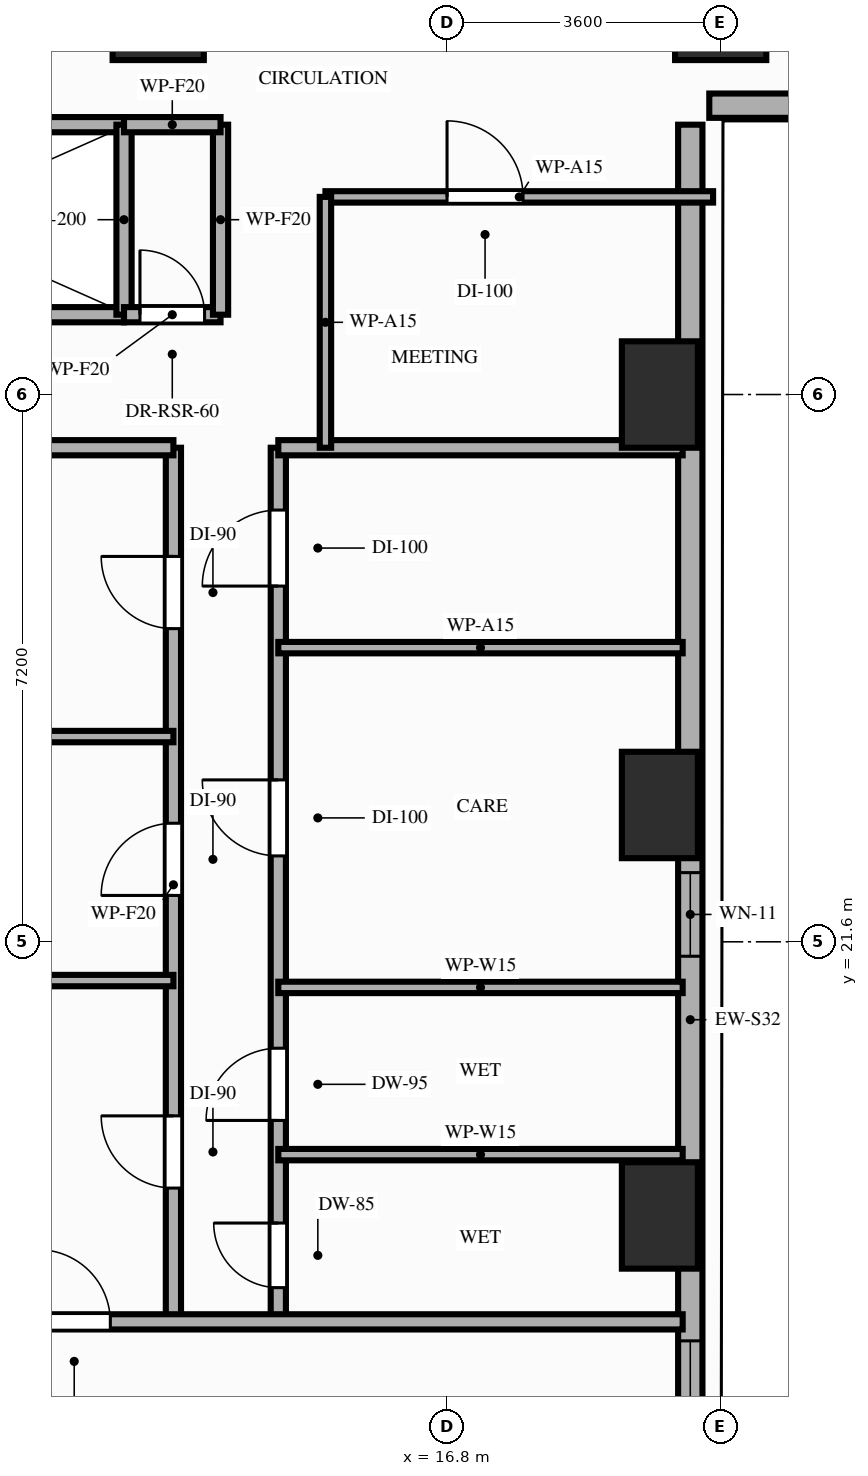
"""IFC4 building model, lengths in metres.
Left out: names, types, materials, properties, quantities, classifications, styles, units other than length and angle.
Written with IfcOpenShell. Run it as: python <this file> out.ifc"""

import sys

from ifc_helpers import new_model, si_unit, direction, frame, frame_2d, origin, origin_2d, place, context, subcontext, project, spatial, rectangle, extrude, element, fill, save


model = new_model("IFC4")
c1 = context("Model", 3, precision=1e-05, world=origin(), true_north=direction((0.0, 1.0)))
c2 = subcontext(c1, "Body", "Model", "MODEL_VIEW")
j1 = project(units=[si_unit("LENGTHUNIT", "METRE"), si_unit("PLANEANGLEUNIT", "RADIAN")], contexts=[c1])
p1 = place(None, origin())
s1 = spatial("IfcSite", under=j1, at=p1, CompositionType="ELEMENT")
p2 = place(p1, origin())
s2 = spatial("IfcBuilding", under=s1, at=p2, CompositionType="ELEMENT")
p3 = place(p2, frame((0.0, 0.0, 30.2)))
s3 = spatial("IfcBuildingStorey", under=s2, at=p3, CompositionType="ELEMENT", Elevation=30.2)
for number, where, z_axis, x_axis in (
    (1, (13.0, 33.8, 0.0), (0.0, 0.0, 1.0), (1.0, 0.0, 0.0)),
    (2, (20.4, 33.8, 0.0), (0.0, 0.0, 1.0), (1.0, 0.0, 0.0)),
):
    element("IfcColumn", number, at=place(p3, frame(where, z_axis=z_axis, x_axis=x_axis)), inside=s3, PredefinedType="COLUMN", context=c2, shape_type="SweptSolid", body=[
        extrude(rectangle(XDim=1.2, YDim=1.2, at=origin_2d()), origin(), (0.0, 0.0, 1.0), 3.2),
    ])
for number, where, z_axis, x_axis in (
    (3, (19.6, 18.0, 0.0), (0.0, 0.0, 1.0), (1.0, 0.0, 0.0)),
    (4, (19.6, 23.4, 0.0), (0.0, 0.0, 1.0), (1.0, 0.0, 0.0)),
    (5, (19.6, 28.8, 0.0), (0.0, 0.0, 1.0), (1.0, 0.0, 0.0)),
):
    element("IfcColumn", number, at=place(p3, frame(where, z_axis=z_axis, x_axis=x_axis)), inside=s3, PredefinedType="COLUMN", context=c2, shape_type="SweptSolid", body=[
        extrude(rectangle(XDim=1.0, YDim=1.4, at=origin_2d()), origin(), (0.0, 0.0, 1.0), 3.2),
    ])
p4 = place(p3, frame((20.0, 8.8, 0.0), z_axis=(0.0, 0.0, 1.0), x_axis=(0.0, 1.0, 0.0)))
e6 = element("IfcWall", 6, at=p4, inside=s3, PredefinedType="STANDARD", context=c2, shape_type="SweptSolid", body=[
    extrude(rectangle(XDim=23.55, YDim=0.32, at=frame_2d((11.775, 0.0))), origin(), (0.0, 0.0, 1.0), 2.41),
])
p5 = place(p4, frame((12.61, 0.0, 0.85)))
e7 = element("IfcOpeningElement", 7, at=p5, cuts=e6, PredefinedType="OPENING", context=c2, shape_type="SweptSolid", body=[
    extrude(rectangle(XDim=1.1, YDim=1.31, at=frame_2d((0.55, 0.655))), frame((0.0, 0.17, 0.0), z_axis=(0.0, -1.0, 0.0), x_axis=(1.0, 0.0, 0.0)), (0.0, 0.0, 1.0), 0.34),
])
p6 = place(p4, frame((5.15, 0.0, 0.85)))
e8 = element("IfcOpeningElement", 8, at=p6, cuts=e6, PredefinedType="OPENING", context=c2, shape_type="SweptSolid", body=[
    extrude(rectangle(XDim=2.4, YDim=1.31, at=frame_2d((1.2, 0.655))), frame((0.0, 0.17, 0.0), z_axis=(0.0, -1.0, 0.0), x_axis=(1.0, 0.0, 0.0)), (0.0, 0.0, 1.0), 0.34),
])
p7 = place(p3, frame((20.25, 32.6, 0.0), z_axis=(0.0, 0.0, 1.0), x_axis=(1.0, 0.0, 0.0)))
e9 = element("IfcWall", 9, at=p7, inside=s3, PredefinedType="STANDARD", context=c2, shape_type="SweptSolid", body=[
    extrude(rectangle(XDim=7.35, YDim=0.32, at=frame_2d((3.675, 0.0))), origin(), (0.0, 0.0, 1.0), 2.41),
])
for number, where, z_axis, x_axis in (
    (10, (7.0, 29.85, 0.0), (0.0, 0.0, 1.0), (1.0, 0.0, 0.0)),
    (11, (7.0, 32.35, 0.0), (0.0, 0.0, 1.0), (1.0, 0.0, 0.0)),
):
    element("IfcWall", number, at=place(p3, frame(where, z_axis=z_axis, x_axis=x_axis)), inside=s3, PredefinedType="MOVABLE", context=c2, shape_type="SweptSolid", body=[
        extrude(rectangle(XDim=5.55, YDim=0.2, at=frame_2d((2.775, 0.0))), origin(), (0.0, 0.0, 1.0), 3.02),
    ])
p8 = place(p3, frame((12.55, 29.85, 0.0), z_axis=(0.0, 0.0, 1.0), x_axis=(0.0, 1.0, 0.0)))
e12 = element("IfcWall", 12, at=p8, inside=s3, PredefinedType="MOVABLE", context=c2, shape_type="SweptSolid", body=[
    extrude(rectangle(XDim=2.5, YDim=0.2, at=frame_2d((1.25, 0.0))), origin(), (0.0, 0.0, 1.0), 3.02),
])
p9 = place(p3, frame((12.55, 29.85, 0.0), z_axis=(0.0, 0.0, 1.0), x_axis=(1.0, 0.0, 0.0)))
e13 = element("IfcWall", 13, at=p9, inside=s3, PredefinedType="PARTITIONING", context=c2, shape_type="SweptSolid", body=[
    extrude(rectangle(XDim=1.27, YDim=0.2, at=frame_2d((0.635, 0.0))), origin(), (0.0, 0.0, 1.0), 3.02),
])
p10 = place(p9, frame((0.21, 0.0, 0.0)))
e14 = element("IfcOpeningElement", 14, at=p10, cuts=e13, PredefinedType="OPENING", context=c2, shape_type="SweptSolid", body=[
    extrude(rectangle(XDim=0.85, YDim=2.05, at=frame_2d((0.425, 1.025))), frame((0.0, 0.11, 0.0), z_axis=(0.0, -1.0, 0.0), x_axis=(1.0, 0.0, 0.0)), (0.0, 0.0, 1.0), 0.22),
])
p11 = place(p3, frame((13.82, 29.85, 0.0), z_axis=(0.0, 0.0, 1.0), x_axis=(0.0, 1.0, 0.0)))
e15 = element("IfcWall", 15, at=p11, inside=s3, PredefinedType="PARTITIONING", context=c2, shape_type="SweptSolid", body=[
    extrude(rectangle(XDim=2.5, YDim=0.2, at=frame_2d((1.25, 0.0))), origin(), (0.0, 0.0, 1.0), 3.02),
])
p12 = place(p3, frame((12.55, 32.35, 0.0), z_axis=(0.0, 0.0, 1.0), x_axis=(1.0, 0.0, 0.0)))
e16 = element("IfcWall", 16, at=p12, inside=s3, PredefinedType="PARTITIONING", context=c2, shape_type="SweptSolid", body=[
    extrude(rectangle(XDim=1.27, YDim=0.2, at=frame_2d((0.635, 0.0))), origin(), (0.0, 0.0, 1.0), 3.02),
])
p13 = place(p3, frame((13.2, 16.6, 0.0), z_axis=(0.0, 0.0, 1.0), x_axis=(0.0, 1.0, 0.0)))
e17 = element("IfcWall", 17, at=p13, inside=s3, PredefinedType="PARTITIONING", context=c2, shape_type="SweptSolid", body=[
    extrude(rectangle(XDim=11.5, YDim=0.2, at=frame_2d((5.75, 0.0))), origin(), (0.0, 0.0, 1.0), 2.41),
])
p14 = place(p13, frame((1.76, 0.0, 0.0)))
e18 = element("IfcOpeningElement", 18, at=p14, cuts=e17, PredefinedType="OPENING", context=c2, shape_type="SweptSolid", body=[
    extrude(rectangle(XDim=0.95, YDim=2.15, at=frame_2d((0.475, 1.075))), frame((0.0, 0.11, 0.0), z_axis=(0.0, -1.0, 0.0), x_axis=(1.0, 0.0, 0.0)), (0.0, 0.0, 1.0), 0.22),
])
p15 = place(p13, frame((5.61, 0.0, 0.0)))
e19 = element("IfcOpeningElement", 19, at=p15, cuts=e17, PredefinedType="OPENING", context=c2, shape_type="SweptSolid", body=[
    extrude(rectangle(XDim=0.95, YDim=2.15, at=frame_2d((0.475, 1.075))), frame((0.0, 0.11, 0.0), z_axis=(0.0, -1.0, 0.0), x_axis=(1.0, 0.0, 0.0)), (0.0, 0.0, 1.0), 0.22),
])
p16 = place(p13, frame((9.12, 0.0, 0.0)))
e20 = element("IfcOpeningElement", 20, at=p16, cuts=e17, PredefinedType="OPENING", context=c2, shape_type="SweptSolid", body=[
    extrude(rectangle(XDim=0.95, YDim=2.15, at=frame_2d((0.475, 1.075))), frame((0.0, 0.11, 0.0), z_axis=(0.0, -1.0, 0.0), x_axis=(1.0, 0.0, 0.0)), (0.0, 0.0, 1.0), 0.22),
])
p17 = place(p3, frame((14.58, 16.6, 0.0), z_axis=(0.0, 0.0, 1.0), x_axis=(0.0, 1.0, 0.0)))
e21 = element("IfcWall", 21, at=p17, inside=s3, PredefinedType="PARTITIONING", context=c2, shape_type="SweptSolid", body=[
    extrude(rectangle(XDim=11.5, YDim=0.2, at=frame_2d((5.75, 0.0))), origin(), (0.0, 0.0, 1.0), 2.41),
])
p18 = place(p17, frame((0.45, 0.0, 0.0)))
e22 = element("IfcOpeningElement", 22, at=p18, cuts=e21, PredefinedType="OPENING", context=c2, shape_type="SweptSolid", body=[
    extrude(rectangle(XDim=0.85, YDim=2.1, at=frame_2d((0.425, 1.05))), frame((0.0, 0.11, 0.0), z_axis=(0.0, -1.0, 0.0), x_axis=(1.0, 0.0, 0.0)), (0.0, 0.0, 1.0), 0.22),
])
p19 = place(p17, frame((2.65, 0.0, 0.0)))
e23 = element("IfcOpeningElement", 23, at=p19, cuts=e21, PredefinedType="OPENING", context=c2, shape_type="SweptSolid", body=[
    extrude(rectangle(XDim=0.95, YDim=2.1, at=frame_2d((0.475, 1.05))), frame((0.0, 0.11, 0.0), z_axis=(0.0, -1.0, 0.0), x_axis=(1.0, 0.0, 0.0)), (0.0, 0.0, 1.0), 0.22),
])
p20 = place(p17, frame((6.13, 0.0, 0.0)))
e24 = element("IfcOpeningElement", 24, at=p20, cuts=e21, PredefinedType="OPENING", context=c2, shape_type="SweptSolid", body=[
    extrude(rectangle(XDim=1.0, YDim=2.15, at=frame_2d((0.5, 1.075))), frame((0.0, 0.11, 0.0), z_axis=(0.0, -1.0, 0.0), x_axis=(1.0, 0.0, 0.0)), (0.0, 0.0, 1.0), 0.22),
])
p21 = place(p17, frame((9.68, 0.0, 0.0)))
e25 = element("IfcOpeningElement", 25, at=p21, cuts=e21, PredefinedType="OPENING", context=c2, shape_type="SweptSolid", body=[
    extrude(rectangle(XDim=1.0, YDim=2.15, at=frame_2d((0.5, 1.075))), frame((0.0, 0.11, 0.0), z_axis=(0.0, -1.0, 0.0), x_axis=(1.0, 0.0, 0.0)), (0.0, 0.0, 1.0), 0.22),
])
p22 = place(p3, frame((3.9, 16.6, 0.0), z_axis=(0.0, 0.0, 1.0), x_axis=(1.0, 0.0, 0.0)))
e26 = element("IfcWall", 26, at=p22, inside=s3, PredefinedType="PARTITIONING", context=c2, shape_type="SweptSolid", body=[
    extrude(rectangle(XDim=16.0, YDim=0.2, at=frame_2d((8.0, 0.0))), origin(), (0.0, 0.0, 1.0), 2.41),
])
p23 = place(p22, frame((7.52, 0.0, 0.0)))
e27 = element("IfcOpeningElement", 27, at=p23, cuts=e26, PredefinedType="OPENING", context=c2, shape_type="SweptSolid", body=[
    extrude(rectangle(XDim=0.95, YDim=2.15, at=frame_2d((0.475, 1.075))), frame((0.0, 0.11, 0.0), z_axis=(0.0, -1.0, 0.0), x_axis=(1.0, 0.0, 0.0)), (0.0, 0.0, 1.0), 0.22),
])
p24 = place(p3, frame((6.0, 28.1, 0.0), z_axis=(0.0, 0.0, 1.0), x_axis=(1.0, 0.0, 0.0)))
e28 = element("IfcWall", 28, at=p24, inside=s3, PredefinedType="PARTITIONING", context=c2, shape_type="SweptSolid", body=[
    extrude(rectangle(XDim=7.2, YDim=0.2, at=frame_2d((3.6, 0.0))), origin(), (0.0, 0.0, 1.0), 3.02),
])
p25 = place(p3, frame((14.58, 28.1, 0.0), z_axis=(0.0, 0.0, 1.0), x_axis=(1.0, 0.0, 0.0)))
e29 = element("IfcWall", 29, at=p25, inside=s3, PredefinedType="PARTITIONING", context=c2, shape_type="SweptSolid", body=[
    extrude(rectangle(XDim=5.32, YDim=0.2, at=frame_2d((2.66, 0.0))), origin(), (0.0, 0.0, 1.0), 2.41),
])
p26 = place(p3, frame((15.2, 31.4, 0.0), z_axis=(0.0, 0.0, 1.0), x_axis=(1.0, 0.0, 0.0)))
e30 = element("IfcWall", 30, at=p26, inside=s3, PredefinedType="PARTITIONING", context=c2, shape_type="SweptSolid", body=[
    extrude(rectangle(XDim=5.1, YDim=0.15, at=frame_2d((2.55, 0.0))), origin(), (0.0, 0.0, 1.0), 2.41),
])
p27 = place(p26, frame((1.6, 0.0, 0.0)))
e31 = element("IfcOpeningElement", 31, at=p27, cuts=e30, PredefinedType="OPENING", context=c2, shape_type="SweptSolid", body=[
    extrude(rectangle(XDim=1.0, YDim=2.15, at=frame_2d((0.5, 1.075))), frame((0.0, 0.085, 0.0), z_axis=(0.0, -1.0, 0.0), x_axis=(1.0, 0.0, 0.0)), (0.0, 0.0, 1.0), 0.17),
])
p28 = place(p3, frame((15.2, 28.1, 0.0), z_axis=(0.0, 0.0, 1.0), x_axis=(0.0, 1.0, 0.0)))
e32 = element("IfcWall", 32, at=p28, inside=s3, PredefinedType="PARTITIONING", context=c2, shape_type="SweptSolid", body=[
    extrude(rectangle(XDim=3.3, YDim=0.15, at=frame_2d((1.65, 0.0))), origin(), (0.0, 0.0, 1.0), 2.41),
])
for number, where, z_axis, x_axis in (
    (33, (3.9, 21.09, 0.0), (0.0, 0.0, 1.0), (1.0, 0.0, 0.0)),
    (34, (3.9, 24.3, 0.0), (0.0, 0.0, 1.0), (1.0, 0.0, 0.0)),
):
    element("IfcWall", number, at=place(p3, frame(where, z_axis=z_axis, x_axis=x_axis)), inside=s3, PredefinedType="PARTITIONING", context=c2, shape_type="SweptSolid", body=[
        extrude(rectangle(XDim=9.3, YDim=0.15, at=frame_2d((4.65, 0.0))), origin(), (0.0, 0.0, 1.0), 2.41),
    ])
for number, where, z_axis, x_axis in (
    (35, (14.58, 18.8, 0.0), (0.0, 0.0, 1.0), (1.0, 0.0, 0.0)),
    (36, (14.58, 21.0, 0.0), (0.0, 0.0, 1.0), (1.0, 0.0, 0.0)),
    (37, (14.58, 25.47, 0.0), (0.0, 0.0, 1.0), (1.0, 0.0, 0.0)),
):
    element("IfcWall", number, at=place(p3, frame(where, z_axis=z_axis, x_axis=x_axis)), inside=s3, PredefinedType="PARTITIONING", context=c2, shape_type="SweptSolid", body=[
        extrude(rectangle(XDim=5.32, YDim=0.15, at=frame_2d((2.66, 0.0))), origin(), (0.0, 0.0, 1.0), 2.41),
    ])
p29 = place(p5, origin())
e38 = element("IfcWindow", 38, at=p29, inside=s3, PartitioningType="SINGLE_PANEL", PredefinedType="WINDOW", context=c2, shape_type="SweptSolid", body=[
    extrude(rectangle(XDim=1.1, YDim=1.31, at=frame_2d((0.55, 0.655))), frame((0.0, 0.03, 0.0), z_axis=(0.0, -1.0, 0.0), x_axis=(1.0, 0.0, 0.0)), (0.0, 0.0, 1.0), 0.06),
])
fill(e7, e38)
p30 = place(p6, origin())
e39 = element("IfcWindow", 39, at=p30, inside=s3, PartitioningType="SINGLE_PANEL", PredefinedType="WINDOW", context=c2, shape_type="SweptSolid", body=[
    extrude(rectangle(XDim=2.4, YDim=1.31, at=frame_2d((1.2, 0.655))), frame((0.0, 0.03, 0.0), z_axis=(0.0, -1.0, 0.0), x_axis=(1.0, 0.0, 0.0)), (0.0, 0.0, 1.0), 0.06),
])
fill(e8, e39)
p31 = place(p10, origin())
e40 = element("IfcDoor", 40, at=p31, inside=s3, OperationType="SINGLE_SWING_LEFT", PredefinedType="DOOR", context=c2, shape_type="SweptSolid", body=[
    extrude(rectangle(XDim=0.85, YDim=2.05, at=frame_2d((0.425, 1.025))), frame((0.0, 0.025, 0.0), z_axis=(0.0, -1.0, 0.0), x_axis=(1.0, 0.0, 0.0)), (0.0, 0.0, 1.0), 0.05),
])
fill(e14, e40)
p32 = place(p27, origin())
e41 = element("IfcDoor", 41, at=p32, inside=s3, OperationType="SINGLE_SWING_LEFT", PredefinedType="DOOR", context=c2, shape_type="SweptSolid", body=[
    extrude(rectangle(XDim=1.0, YDim=2.15, at=frame_2d((0.5, 1.075))), frame((0.0, 0.025, 0.0), z_axis=(0.0, -1.0, 0.0), x_axis=(1.0, 0.0, 0.0)), (0.0, 0.0, 1.0), 0.05),
])
fill(e31, e41)
p33 = place(p14, origin())
e42 = element("IfcDoor", 42, at=p33, inside=s3, OperationType="SINGLE_SWING_RIGHT", PredefinedType="DOOR", context=c2, shape_type="SweptSolid", body=[
    extrude(rectangle(XDim=0.95, YDim=2.15, at=frame_2d((0.475, 1.075))), frame((0.0, 0.025, 0.0), z_axis=(0.0, -1.0, 0.0), x_axis=(1.0, 0.0, 0.0)), (0.0, 0.0, 1.0), 0.05),
])
fill(e18, e42)
p34 = place(p15, origin())
e43 = element("IfcDoor", 43, at=p34, inside=s3, OperationType="SINGLE_SWING_LEFT", PredefinedType="DOOR", context=c2, shape_type="SweptSolid", body=[
    extrude(rectangle(XDim=0.95, YDim=2.15, at=frame_2d((0.475, 1.075))), frame((0.0, 0.025, 0.0), z_axis=(0.0, -1.0, 0.0), x_axis=(1.0, 0.0, 0.0)), (0.0, 0.0, 1.0), 0.05),
])
fill(e19, e43)
p35 = place(p16, origin())
e44 = element("IfcDoor", 44, at=p35, inside=s3, OperationType="SINGLE_SWING_RIGHT", PredefinedType="DOOR", context=c2, shape_type="SweptSolid", body=[
    extrude(rectangle(XDim=0.95, YDim=2.15, at=frame_2d((0.475, 1.075))), frame((0.0, 0.025, 0.0), z_axis=(0.0, -1.0, 0.0), x_axis=(1.0, 0.0, 0.0)), (0.0, 0.0, 1.0), 0.05),
])
fill(e20, e44)
p36 = place(p23, origin())
e45 = element("IfcDoor", 45, at=p36, inside=s3, OperationType="SINGLE_SWING_LEFT", PredefinedType="DOOR", context=c2, shape_type="SweptSolid", body=[
    extrude(rectangle(XDim=0.95, YDim=2.15, at=frame_2d((0.475, 1.075))), frame((0.0, 0.025, 0.0), z_axis=(0.0, -1.0, 0.0), x_axis=(1.0, 0.0, 0.0)), (0.0, 0.0, 1.0), 0.05),
])
fill(e27, e45)
p37 = place(p18, origin())
e46 = element("IfcDoor", 46, at=p37, inside=s3, OperationType="SINGLE_SWING_RIGHT", PredefinedType="DOOR", context=c2, shape_type="SweptSolid", body=[
    extrude(rectangle(XDim=0.85, YDim=2.1, at=frame_2d((0.425, 1.05))), frame((0.0, 0.025, 0.0), z_axis=(0.0, -1.0, 0.0), x_axis=(1.0, 0.0, 0.0)), (0.0, 0.0, 1.0), 0.05),
])
fill(e22, e46)
p38 = place(p19, origin())
e47 = element("IfcDoor", 47, at=p38, inside=s3, OperationType="SINGLE_SWING_LEFT", PredefinedType="DOOR", context=c2, shape_type="SweptSolid", body=[
    extrude(rectangle(XDim=0.95, YDim=2.1, at=frame_2d((0.475, 1.05))), frame((0.0, 0.025, 0.0), z_axis=(0.0, -1.0, 0.0), x_axis=(1.0, 0.0, 0.0)), (0.0, 0.0, 1.0), 0.05),
])
fill(e23, e47)
p39 = place(p20, origin())
e48 = element("IfcDoor", 48, at=p39, inside=s3, OperationType="SINGLE_SWING_RIGHT", PredefinedType="DOOR", context=c2, shape_type="SweptSolid", body=[
    extrude(rectangle(XDim=1.0, YDim=2.15, at=frame_2d((0.5, 1.075))), frame((0.0, 0.025, 0.0), z_axis=(0.0, -1.0, 0.0), x_axis=(1.0, 0.0, 0.0)), (0.0, 0.0, 1.0), 0.05),
])
fill(e24, e48)
p40 = place(p21, origin())
e49 = element("IfcDoor", 49, at=p40, inside=s3, OperationType="SINGLE_SWING_LEFT", PredefinedType="DOOR", context=c2, shape_type="SweptSolid", body=[
    extrude(rectangle(XDim=1.0, YDim=2.15, at=frame_2d((0.5, 1.075))), frame((0.0, 0.025, 0.0), z_axis=(0.0, -1.0, 0.0), x_axis=(1.0, 0.0, 0.0)), (0.0, 0.0, 1.0), 0.05),
])
fill(e25, e49)
save(model, sys.argv[1])
